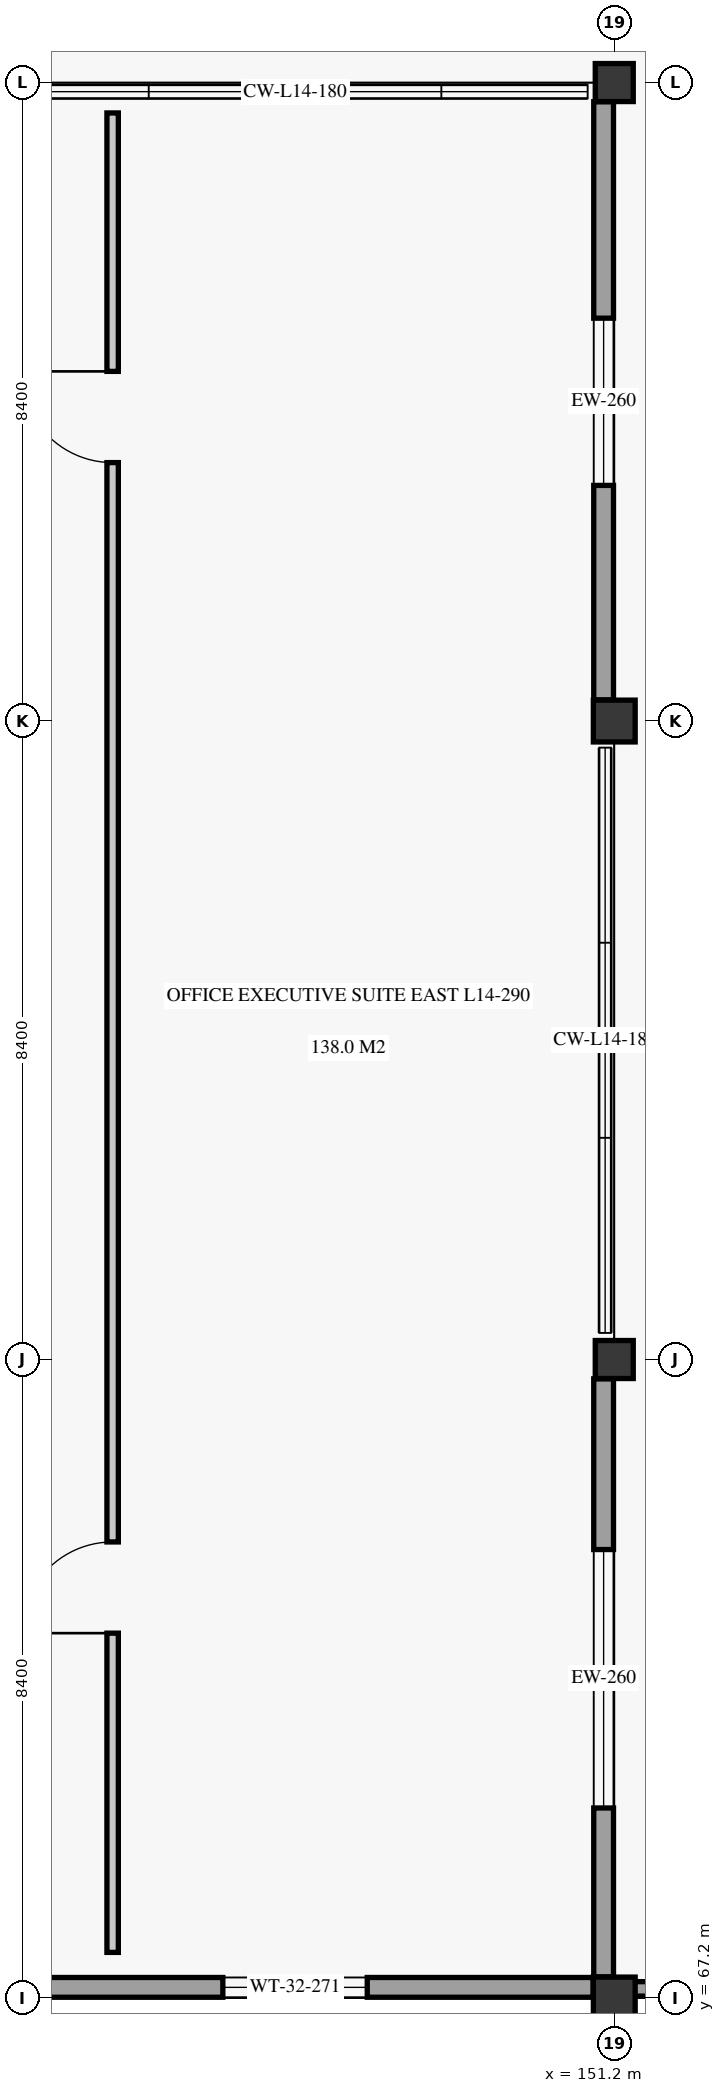
"""IFC4 building model, lengths in metres.
Left out: names, types, materials, properties, quantities, classifications, styles, units other than length and angle.
Written with IfcOpenShell. Run it as: python <this file> out.ifc"""

import sys

from ifc_helpers import new_model, si_unit, direction, frame, frame_2d, origin, origin_2d, place, context, subcontext, project, spatial, rectangle, extrude, element, fill, save


model = new_model("IFC4")
c1 = context("Model", 3, precision=1e-05, world=origin(), true_north=direction((0.0, 1.0)))
c2 = subcontext(c1, "Body", "Model", "MODEL_VIEW")
j1 = project(units=[si_unit("LENGTHUNIT", "METRE"), si_unit("PLANEANGLEUNIT", "RADIAN")], contexts=[c1])
p1 = place(None, origin())
s1 = spatial("IfcSite", under=j1, at=p1, CompositionType="ELEMENT")
p2 = place(p1, origin())
s2 = spatial("IfcBuilding", under=s1, at=p2, CompositionType="ELEMENT")
p3 = place(p2, frame((0.0, 0.0, 58.7)))
s3 = spatial("IfcBuildingStorey", under=s2, at=p3, CompositionType="ELEMENT", Elevation=58.7)
p4 = place(p3, frame((151.2, 67.2, 0.0), z_axis=(0.0, 0.0, 1.0), x_axis=(1.0, 0.0, 0.0)))
e1 = element("IfcColumn", 1, at=p4, inside=s3, PredefinedType="COLUMN", context=c2, shape_type="SweptSolid", body=[
    extrude(rectangle(XDim=0.55, YDim=0.55, at=origin_2d()), origin(), (0.0, 0.0, 1.0), 3.72),
])
p5 = place(p3, frame((151.2, 75.6, 0.0), z_axis=(0.0, 0.0, 1.0), x_axis=(1.0, 0.0, 0.0)))
e2 = element("IfcColumn", 2, at=p5, inside=s3, PredefinedType="COLUMN", context=c2, shape_type="SweptSolid", body=[
    extrude(rectangle(XDim=0.5, YDim=0.5, at=origin_2d()), origin(), (0.0, 0.0, 1.0), 3.72),
])
p6 = place(p3, frame((151.2, 84.0, 0.0), z_axis=(0.0, 0.0, 1.0), x_axis=(1.0, 0.0, 0.0)))
e3 = element("IfcColumn", 3, at=p6, inside=s3, PredefinedType="COLUMN", context=c2, shape_type="SweptSolid", body=[
    extrude(rectangle(XDim=0.55, YDim=0.55, at=origin_2d()), origin(), (0.0, 0.0, 1.0), 3.72),
])
p7 = place(p3, frame((151.2, 92.4, 0.0), z_axis=(0.0, 0.0, 1.0), x_axis=(1.0, 0.0, 0.0)))
e4 = element("IfcColumn", 4, at=p7, inside=s3, PredefinedType="COLUMN", context=c2, shape_type="SweptSolid", body=[
    extrude(rectangle(XDim=0.5, YDim=0.5, at=origin_2d()), origin(), (0.0, 0.0, 1.0), 3.72),
])
p8 = place(p3, frame((143.054, 67.34, 0.0), z_axis=(0.0, 0.0, 1.0), x_axis=(1.0, 0.0, 0.0)))
e5 = element("IfcWall", 5, at=p8, inside=s3, PredefinedType="SOLIDWALL", context=c2, shape_type="SweptSolid", body=[
    extrude(rectangle(XDim=7.868, YDim=0.26, at=frame_2d((3.934, 0.0))), origin(), (0.0, 0.0, 1.0), 3.04),
])
p9 = place(p8, frame((2.996, 0.0, 0.85)))
e6 = element("IfcOpeningElement", 6, at=p9, cuts=e5, PredefinedType="OPENING", context=c2, shape_type="SweptSolid", body=[
    extrude(rectangle(XDim=1.9, YDim=1.75, at=frame_2d((0.95, 0.875))), frame((0.0, 0.14, 0.0), z_axis=(0.0, -1.0, 0.0), x_axis=(1.0, 0.0, 0.0)), (0.0, 0.0, 1.0), 0.28),
])
p10 = place(p3, frame((151.06, 67.478, 0.0), z_axis=(0.0, 0.0, 1.0), x_axis=(0.0, 1.0, 0.0)))
e7 = element("IfcWall", 7, at=p10, inside=s3, PredefinedType="SOLIDWALL", context=c2, shape_type="SweptSolid", body=[
    extrude(rectangle(XDim=7.868, YDim=0.26, at=frame_2d((3.934, 0.0))), origin(), (0.0, 0.0, 1.0), 3.04),
])
p11 = place(p10, frame((2.222, 0.0, 0.85)))
e8 = element("IfcOpeningElement", 8, at=p11, cuts=e7, PredefinedType="OPENING", context=c2, shape_type="SweptSolid", body=[
    extrude(rectangle(XDim=3.4, YDim=1.9, at=frame_2d((1.7, 0.95))), frame((0.0, 0.14, 0.0), z_axis=(0.0, -1.0, 0.0), x_axis=(1.0, 0.0, 0.0)), (0.0, 0.0, 1.0), 0.28),
])
p12 = place(p3, frame((151.06, 84.278, 0.0), z_axis=(0.0, 0.0, 1.0), x_axis=(0.0, 1.0, 0.0)))
e9 = element("IfcWall", 9, at=p12, inside=s3, PredefinedType="SOLIDWALL", context=c2, shape_type="SweptSolid", body=[
    extrude(rectangle(XDim=7.87, YDim=0.26, at=frame_2d((3.935, 0.0))), origin(), (0.0, 0.0, 1.0), 3.04),
])
p13 = place(p12, frame((2.822, 0.0, 0.85)))
e10 = element("IfcOpeningElement", 10, at=p13, cuts=e9, PredefinedType="OPENING", context=c2, shape_type="SweptSolid", body=[
    extrude(rectangle(XDim=2.2, YDim=1.8, at=frame_2d((1.1, 0.9))), frame((0.0, 0.14, 0.0), z_axis=(0.0, -1.0, 0.0), x_axis=(1.0, 0.0, 0.0)), (0.0, 0.0, 1.0), 0.28),
])
p14 = place(p3, frame((151.32, 67.32, 0.0), z_axis=(0.0, 0.0, 1.0), x_axis=(1.0, 0.0, 0.0)))
e11 = element("IfcWall", 11, at=p14, inside=s3, PredefinedType="PARAPET", context=c2, shape_type="SweptSolid", body=[
    extrude(rectangle(XDim=8.16, YDim=0.19, at=frame_2d((4.08, 0.0))), origin(), (0.0, 0.0, 1.0), 1.25),
])
p15 = place(p3, frame((144.6, 67.8, 0.0), z_axis=(0.0, 0.0, 1.0), x_axis=(0.0, 1.0, 0.0)))
e12 = element("IfcWall", 12, at=p15, inside=s3, PredefinedType="PARTITIONING", context=c2, shape_type="SweptSolid", body=[
    extrude(rectangle(XDim=24.2, YDim=0.15, at=frame_2d((12.1, 0.0))), origin(), (0.0, 0.0, 1.0), 3.34),
])
p16 = place(p15, frame((4.2, 0.0, 0.0)))
e13 = element("IfcOpeningElement", 13, at=p16, cuts=e12, PredefinedType="OPENING", context=c2, shape_type="SweptSolid", body=[
    extrude(rectangle(XDim=1.2, YDim=2.3, at=frame_2d((0.6, 1.15))), frame((0.0, 0.085, 0.0), z_axis=(0.0, -1.0, 0.0), x_axis=(1.0, 0.0, 0.0)), (0.0, 0.0, 1.0), 0.17),
])
p17 = place(p15, frame((19.6, 0.0, 0.0)))
e14 = element("IfcOpeningElement", 14, at=p17, cuts=e12, PredefinedType="OPENING", context=c2, shape_type="SweptSolid", body=[
    extrude(rectangle(XDim=1.2, YDim=2.3, at=frame_2d((0.6, 1.15))), frame((0.0, 0.085, 0.0), z_axis=(0.0, -1.0, 0.0), x_axis=(1.0, 0.0, 0.0)), (0.0, 0.0, 1.0), 0.17),
])
p18 = place(p9, origin())
e15 = element("IfcWindow", 15, at=p18, inside=s3, PartitioningType="SINGLE_PANEL", PredefinedType="WINDOW", context=c2, shape_type="SweptSolid", body=[
    extrude(rectangle(XDim=1.9, YDim=1.75, at=frame_2d((0.95, 0.875))), frame((0.0, 0.03, 0.0), z_axis=(0.0, -1.0, 0.0), x_axis=(1.0, 0.0, 0.0)), (0.0, 0.0, 1.0), 0.06),
])
fill(e6, e15)
p19 = place(p11, origin())
e16 = element("IfcWindow", 16, at=p19, inside=s3, PartitioningType="SINGLE_PANEL", PredefinedType="WINDOW", context=c2, shape_type="SweptSolid", body=[
    extrude(rectangle(XDim=3.4, YDim=1.9, at=frame_2d((1.7, 0.95))), frame((0.0, 0.03, 0.0), z_axis=(0.0, -1.0, 0.0), x_axis=(1.0, 0.0, 0.0)), (0.0, 0.0, 1.0), 0.06),
])
fill(e8, e16)
p20 = place(p13, origin())
e17 = element("IfcWindow", 17, at=p20, inside=s3, PartitioningType="SINGLE_PANEL", PredefinedType="WINDOW", context=c2, shape_type="SweptSolid", body=[
    extrude(rectangle(XDim=2.2, YDim=1.8, at=frame_2d((1.1, 0.9))), frame((0.0, 0.03, 0.0), z_axis=(0.0, -1.0, 0.0), x_axis=(1.0, 0.0, 0.0)), (0.0, 0.0, 1.0), 0.06),
])
fill(e10, e17)
p21 = place(p16, origin())
e18 = element("IfcDoor", 18, at=p21, inside=s3, OperationType="SINGLE_SWING_LEFT", PredefinedType="DOOR", context=c2, shape_type="SweptSolid", body=[
    extrude(rectangle(XDim=1.2, YDim=2.3, at=frame_2d((0.6, 1.15))), frame((0.0, 0.025, 0.0), z_axis=(0.0, -1.0, 0.0), x_axis=(1.0, 0.0, 0.0)), (0.0, 0.0, 1.0), 0.05),
])
fill(e13, e18)
p22 = place(p17, origin())
e19 = element("IfcDoor", 19, at=p22, inside=s3, OperationType="SINGLE_SWING_RIGHT", PredefinedType="DOOR", context=c2, shape_type="SweptSolid", body=[
    extrude(rectangle(XDim=1.2, YDim=2.3, at=frame_2d((0.6, 1.15))), frame((0.0, 0.025, 0.0), z_axis=(0.0, -1.0, 0.0), x_axis=(1.0, 0.0, 0.0)), (0.0, 0.0, 1.0), 0.05),
])
fill(e14, e19)
save(model, sys.argv[1])
